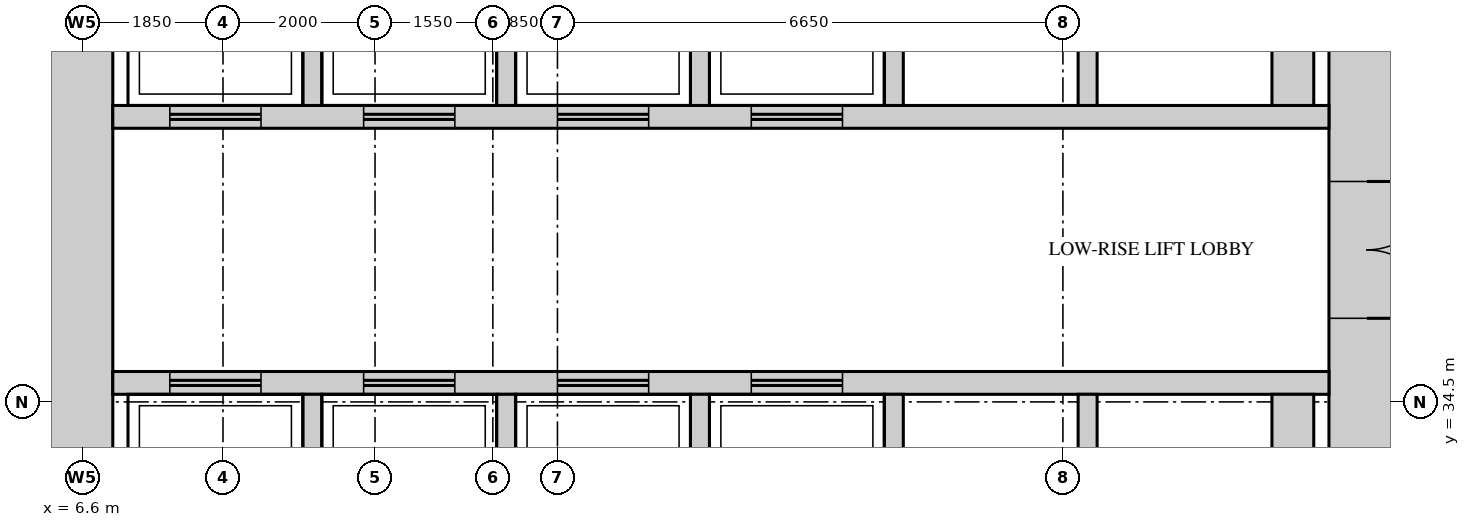
"""IFC4 building model, lengths in metres.
Left out: names, types, materials, properties, quantities, classifications, styles, units other than length and angle.
Written with IfcOpenShell. Run it as: python <this file> out.ifc"""

import sys

from ifc_helpers import new_model, si_unit, direction, frame, frame_2d, origin, place, context, subcontext, project, spatial, rectangle, extrude, source, transform, mapped, element, fill, save


model = new_model("IFC4")
c1 = context("Model", 3, precision=1e-05, world=origin(), true_north=direction((0.0, 1.0)))
c2 = subcontext(c1, "Body", "Model", "MODEL_VIEW")
j1 = project(units=[si_unit("LENGTHUNIT", "METRE"), si_unit("PLANEANGLEUNIT", "RADIAN")], contexts=[c1])
p1 = place(None, origin())
s1 = spatial("IfcSite", under=j1, at=p1, CompositionType="ELEMENT")
p2 = place(p1, origin())
s2 = spatial("IfcBuilding", under=s1, at=p2, CompositionType="ELEMENT")
p3 = place(p2, frame((0.0, 0.0, 119.1)))
s3 = spatial("IfcBuildingStorey", under=s2, at=p3, CompositionType="ELEMENT", Elevation=119.1)
m1 = source(origin(), c2, "Body", "SweptSolid", [
    extrude(rectangle(XDim=28.0, YDim=1.0, at=frame_2d((14.0, 0.0))), origin(), (0.0, 0.0, 1.0), 4.1),
])
p4 = place(p3, frame((23.5, 13.0, 0.0), z_axis=(0.0, 0.0, 1.0), x_axis=(0.0, 1.0, 0.0)))
e1 = element("IfcWall", 1, at=p4, inside=s3, PredefinedType="SHEAR", context=c2, shape_type="MappedRepresentation", body=[
    mapped(m1, transform((0.0, 0.0, 0.0))),
])
m2 = source(origin(), c2, "Body", "SweptSolid", [
    extrude(rectangle(XDim=1.8, YDim=2.1, at=frame_2d((0.9, 1.05))), frame((0.0, 0.51, 0.0), z_axis=(0.0, -1.0, 0.0), x_axis=(1.0, 0.0, 0.0)), (0.0, 0.0, 1.0), 1.02),
])
p5 = place(p4, frame((22.6, 0.0, 0.0)))
e2 = element("IfcOpeningElement", 2, at=p5, cuts=e1, PredefinedType="OPENING", context=c2, shape_type="MappedRepresentation", body=[
    mapped(m2, transform((0.0, 0.0, 0.0))),
])
m3 = source(origin(), c2, "Body", "SweptSolid", [
    extrude(rectangle(XDim=1.2, YDim=2.1, at=frame_2d((0.6, 1.05))), frame((0.0, 0.51, 0.0), z_axis=(0.0, -1.0, 0.0), x_axis=(1.0, 0.0, 0.0)), (0.0, 0.0, 1.0), 1.02),
])
p6 = place(p4, frame((13.85, 0.0, 0.0)))
e3 = element("IfcOpeningElement", 3, at=p6, cuts=e1, PredefinedType="OPENING", context=c2, shape_type="MappedRepresentation", body=[
    mapped(m3, transform((0.0, 0.0, 0.0))),
])
m4 = source(origin(), c2, "Body", "SweptSolid", [
    extrude(rectangle(XDim=0.9, YDim=2.1, at=frame_2d((0.45, 1.05))), frame((0.0, 0.51, 0.0), z_axis=(0.0, -1.0, 0.0), x_axis=(1.0, 0.0, 0.0)), (0.0, 0.0, 1.0), 1.02),
])
p7 = place(p4, frame((2.15, 0.0, 0.0)))
e4 = element("IfcOpeningElement", 4, at=p7, cuts=e1, PredefinedType="OPENING", context=c2, shape_type="MappedRepresentation", body=[
    mapped(m4, transform((0.0, 0.0, 0.0))),
])
p8 = place(p4, frame((7.0, 0.0, 0.0)))
e5 = element("IfcOpeningElement", 5, at=p8, cuts=e1, PredefinedType="OPENING", context=c2, shape_type="MappedRepresentation", body=[
    mapped(m4, transform((0.0, 0.0, 0.0))),
])
p9 = place(p3, frame((6.5, 13.0, 0.0), z_axis=(0.0, 0.0, 1.0), x_axis=(0.0, 1.0, 0.0)))
e6 = element("IfcWall", 6, at=p9, inside=s3, PredefinedType="SHEAR", context=c2, shape_type="MappedRepresentation", body=[
    mapped(m1, transform((0.0, 0.0, 0.0))),
])
m5 = source(origin(), c2, "Body", "SweptSolid", [
    extrude(rectangle(XDim=16.0, YDim=0.3, at=frame_2d((8.0, 0.0))), origin(), (0.0, 0.0, 1.0), 4.1),
])
p10 = place(p3, frame((7.0, 38.25, 0.0), z_axis=(0.0, 0.0, 1.0), x_axis=(1.0, 0.0, 0.0)))
e7 = element("IfcWall", 7, at=p10, inside=s3, PredefinedType="STANDARD", context=c2, shape_type="MappedRepresentation", body=[
    mapped(m5, transform((0.0, 0.0, 0.0))),
])
m6 = source(origin(), c2, "Body", "SweptSolid", [
    extrude(rectangle(XDim=1.2, YDim=2.1, at=frame_2d((0.6, 1.05))), frame((0.0, 0.16, 0.0), z_axis=(0.0, -1.0, 0.0), x_axis=(1.0, 0.0, 0.0)), (0.0, 0.0, 1.0), 0.32),
])
p11 = place(p10, frame((0.75, 0.0, 0.0)))
e8 = element("IfcOpeningElement", 8, at=p11, cuts=e7, PredefinedType="OPENING", context=c2, shape_type="MappedRepresentation", body=[
    mapped(m6, transform((0.0, 0.0, 0.0))),
])
p12 = place(p10, frame((3.3, 0.0, 0.0)))
e9 = element("IfcOpeningElement", 9, at=p12, cuts=e7, PredefinedType="OPENING", context=c2, shape_type="MappedRepresentation", body=[
    mapped(m6, transform((0.0, 0.0, 0.0))),
])
p13 = place(p10, frame((5.85, 0.0, 0.0)))
e10 = element("IfcOpeningElement", 10, at=p13, cuts=e7, PredefinedType="OPENING", context=c2, shape_type="MappedRepresentation", body=[
    mapped(m6, transform((0.0, 0.0, 0.0))),
])
p14 = place(p10, frame((8.4, 0.0, 0.0)))
e11 = element("IfcOpeningElement", 11, at=p14, cuts=e7, PredefinedType="OPENING", context=c2, shape_type="MappedRepresentation", body=[
    mapped(m6, transform((0.0, 0.0, 0.0))),
])
p15 = place(p3, frame((7.0, 34.75, 0.0), z_axis=(0.0, 0.0, 1.0), x_axis=(1.0, 0.0, 0.0)))
e12 = element("IfcWall", 12, at=p15, inside=s3, PredefinedType="STANDARD", context=c2, shape_type="MappedRepresentation", body=[
    mapped(m5, transform((0.0, 0.0, 0.0))),
])
p16 = place(p15, frame((0.75, 0.0, 0.0)))
e13 = element("IfcOpeningElement", 13, at=p16, cuts=e12, PredefinedType="OPENING", context=c2, shape_type="MappedRepresentation", body=[
    mapped(m6, transform((0.0, 0.0, 0.0))),
])
p17 = place(p15, frame((3.3, 0.0, 0.0)))
e14 = element("IfcOpeningElement", 14, at=p17, cuts=e12, PredefinedType="OPENING", context=c2, shape_type="MappedRepresentation", body=[
    mapped(m6, transform((0.0, 0.0, 0.0))),
])
p18 = place(p15, frame((5.85, 0.0, 0.0)))
e15 = element("IfcOpeningElement", 15, at=p18, cuts=e12, PredefinedType="OPENING", context=c2, shape_type="MappedRepresentation", body=[
    mapped(m6, transform((0.0, 0.0, 0.0))),
])
p19 = place(p15, frame((8.4, 0.0, 0.0)))
e16 = element("IfcOpeningElement", 16, at=p19, cuts=e12, PredefinedType="OPENING", context=c2, shape_type="MappedRepresentation", body=[
    mapped(m6, transform((0.0, 0.0, 0.0))),
])
m7 = source(origin(), c2, "Body", "SweptSolid", [
    extrude(rectangle(XDim=2.6, YDim=0.25, at=frame_2d((1.3, 0.0))), origin(), (0.0, 0.0, 1.0), 4.1),
])
for number, where, z_axis, x_axis in (
    (17, (9.625, 38.4, 0.0), (0.0, 0.0, 1.0), (0.0, 1.0, 0.0)),
    (18, (12.175, 38.4, 0.0), (0.0, 0.0, 1.0), (0.0, 1.0, 0.0)),
    (19, (14.725, 38.4, 0.0), (0.0, 0.0, 1.0), (0.0, 1.0, 0.0)),
    (20, (17.275, 38.4, 0.0), (0.0, 0.0, 1.0), (0.0, 1.0, 0.0)),
    (21, (19.825, 38.4, 0.0), (0.0, 0.0, 1.0), (0.0, 1.0, 0.0)),
):
    element("IfcWall", number, at=place(p3, frame(where, z_axis=z_axis, x_axis=x_axis)), inside=s3, PredefinedType="STANDARD", context=c2, shape_type="MappedRepresentation", body=[
        mapped(m7, transform((0.0, 0.0, 0.0))),
    ])
m8 = source(origin(), c2, "Body", "SweptSolid", [
    extrude(rectangle(XDim=2.6, YDim=0.55, at=frame_2d((1.3, 0.0))), origin(), (0.0, 0.0, 1.0), 4.1),
])
p20 = place(p3, frame((22.525, 38.4, 0.0), z_axis=(0.0, 0.0, 1.0), x_axis=(0.0, 1.0, 0.0)))
e22 = element("IfcWall", 22, at=p20, inside=s3, PredefinedType="STANDARD", context=c2, shape_type="MappedRepresentation", body=[
    mapped(m8, transform((0.0, 0.0, 0.0))),
])
m9 = source(origin(), c2, "Body", "SweptSolid", [
    extrude(rectangle(XDim=2.4, YDim=0.25, at=frame_2d((1.2, 0.0))), origin(), (0.0, 0.0, 1.0), 4.1),
])
for number, where, z_axis, x_axis in (
    (23, (9.625, 32.2, 0.0), (0.0, 0.0, 1.0), (0.0, 1.0, 0.0)),
    (24, (12.175, 32.2, 0.0), (0.0, 0.0, 1.0), (0.0, 1.0, 0.0)),
    (25, (14.725, 32.2, 0.0), (0.0, 0.0, 1.0), (0.0, 1.0, 0.0)),
    (26, (17.275, 32.2, 0.0), (0.0, 0.0, 1.0), (0.0, 1.0, 0.0)),
    (27, (19.825, 32.2, 0.0), (0.0, 0.0, 1.0), (0.0, 1.0, 0.0)),
):
    element("IfcWall", number, at=place(p3, frame(where, z_axis=z_axis, x_axis=x_axis)), inside=s3, PredefinedType="STANDARD", context=c2, shape_type="MappedRepresentation", body=[
        mapped(m9, transform((0.0, 0.0, 0.0))),
    ])
m10 = source(origin(), c2, "Body", "SweptSolid", [
    extrude(rectangle(XDim=2.4, YDim=0.55, at=frame_2d((1.2, 0.0))), origin(), (0.0, 0.0, 1.0), 4.1),
])
p21 = place(p3, frame((22.525, 32.2, 0.0), z_axis=(0.0, 0.0, 1.0), x_axis=(0.0, 1.0, 0.0)))
e28 = element("IfcWall", 28, at=p21, inside=s3, PredefinedType="STANDARD", context=c2, shape_type="MappedRepresentation", body=[
    mapped(m10, transform((0.0, 0.0, 0.0))),
])
m11 = source(origin(), c2, "Body", "SweptSolid", [
    extrude(rectangle(XDim=1.8, YDim=2.1, at=frame_2d((0.9, 1.05))), frame((0.0, 0.45, 0.0), z_axis=(0.0, -1.0, 0.0), x_axis=(1.0, 0.0, 0.0)), (0.0, 0.0, 1.0), 0.9),
])
p22 = place(p5, origin())
e29 = element("IfcDoor", 29, at=p22, inside=s3, OperationType="DOUBLE_DOOR_SINGLE_SWING", PredefinedType="DOOR", context=c2, shape_type="MappedRepresentation", body=[
    mapped(m11, transform((0.0, 0.0, 0.0))),
])
fill(e2, e29)
m12 = source(origin(), c2, "Body", "SweptSolid", [
    extrude(rectangle(XDim=1.2, YDim=2.1, at=frame_2d((0.6, 1.05))), frame((0.0, 0.025, 0.0), z_axis=(0.0, -1.0, 0.0), x_axis=(1.0, 0.0, 0.0)), (0.0, 0.0, 1.0), 0.05),
])
p23 = place(p16, origin())
e30 = element("IfcDoor", 30, at=p23, inside=s3, OperationType="DOUBLE_DOOR_SLIDING", PredefinedType="DOOR", context=c2, shape_type="MappedRepresentation", body=[
    mapped(m12, transform((0.0, 0.0, 0.0))),
])
fill(e13, e30)
p24 = place(p17, origin())
e31 = element("IfcDoor", 31, at=p24, inside=s3, OperationType="DOUBLE_DOOR_SLIDING", PredefinedType="DOOR", context=c2, shape_type="MappedRepresentation", body=[
    mapped(m12, transform((0.0, 0.0, 0.0))),
])
fill(e14, e31)
p25 = place(p18, origin())
e32 = element("IfcDoor", 32, at=p25, inside=s3, OperationType="DOUBLE_DOOR_SLIDING", PredefinedType="DOOR", context=c2, shape_type="MappedRepresentation", body=[
    mapped(m12, transform((0.0, 0.0, 0.0))),
])
fill(e15, e32)
p26 = place(p19, origin())
e33 = element("IfcDoor", 33, at=p26, inside=s3, OperationType="DOUBLE_DOOR_SLIDING", PredefinedType="DOOR", context=c2, shape_type="MappedRepresentation", body=[
    mapped(m12, transform((0.0, 0.0, 0.0))),
])
fill(e16, e33)
p27 = place(p11, origin())
e34 = element("IfcDoor", 34, at=p27, inside=s3, OperationType="DOUBLE_DOOR_SLIDING", PredefinedType="DOOR", context=c2, shape_type="MappedRepresentation", body=[
    mapped(m12, transform((0.0, 0.0, 0.0))),
])
fill(e8, e34)
p28 = place(p12, origin())
e35 = element("IfcDoor", 35, at=p28, inside=s3, OperationType="DOUBLE_DOOR_SLIDING", PredefinedType="DOOR", context=c2, shape_type="MappedRepresentation", body=[
    mapped(m12, transform((0.0, 0.0, 0.0))),
])
fill(e9, e35)
p29 = place(p13, origin())
e36 = element("IfcDoor", 36, at=p29, inside=s3, OperationType="DOUBLE_DOOR_SLIDING", PredefinedType="DOOR", context=c2, shape_type="MappedRepresentation", body=[
    mapped(m12, transform((0.0, 0.0, 0.0))),
])
fill(e10, e36)
p30 = place(p14, origin())
e37 = element("IfcDoor", 37, at=p30, inside=s3, OperationType="DOUBLE_DOOR_SLIDING", PredefinedType="DOOR", context=c2, shape_type="MappedRepresentation", body=[
    mapped(m12, transform((0.0, 0.0, 0.0))),
])
fill(e11, e37)
save(model, sys.argv[1])
